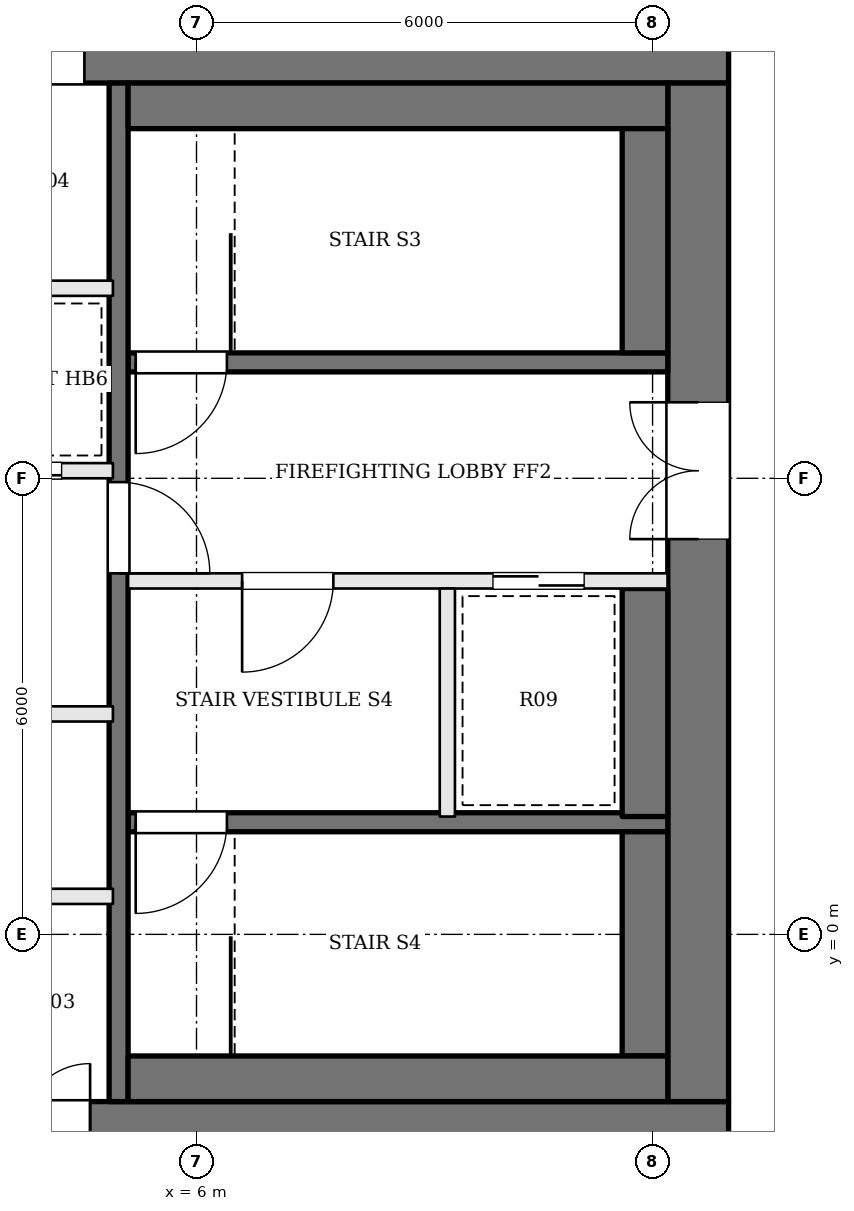
"""IFC4 building model, lengths in metres.
Left out: names, types, materials, properties, quantities, classifications, styles, units other than length and angle.
Written with IfcOpenShell. Run it as: python <this file> out.ifc"""

import sys

from ifc_helpers import new_model, si_unit, direction, frame, frame_2d, origin, place, context, subcontext, project, spatial, rectangle, extrude, element, fill, save


model = new_model("IFC4")
c1 = context("Model", 3, precision=1e-05, world=origin(), true_north=direction((0.0, 1.0)))
c2 = subcontext(c1, "Body", "Model", "MODEL_VIEW")
j1 = project(units=[si_unit("LENGTHUNIT", "METRE"), si_unit("PLANEANGLEUNIT", "RADIAN")], contexts=[c1])
p1 = place(None, origin())
s1 = spatial("IfcSite", under=j1, at=p1, CompositionType="ELEMENT")
p2 = place(p1, origin())
s2 = spatial("IfcBuilding", under=s1, at=p2, CompositionType="ELEMENT")
p3 = place(p2, frame((0.0, 0.0, 303.9)))
s3 = spatial("IfcBuildingStorey", under=s2, at=p3, CompositionType="ELEMENT", Elevation=303.9)
p4 = place(p3, frame((-13.0, 11.6, 0.0), z_axis=(0.0, 0.0, 1.0), x_axis=(1.0, 0.0, 0.0)))
e1 = element("IfcWall", 1, at=p4, inside=s3, PredefinedType="SHEAR", context=c2, shape_type="SweptSolid", body=[
    extrude(rectangle(XDim=26.0, YDim=0.8, at=frame_2d((13.0, 0.0))), origin(), (0.0, 0.0, 1.0), 3.9),
])
p5 = place(p4, frame((9.375, 0.0, 0.0)))
e2 = element("IfcOpeningElement", 2, at=p5, cuts=e1, PredefinedType="OPENING", context=c2, shape_type="SweptSolid", body=[
    extrude(rectangle(XDim=0.7, YDim=2.1, at=frame_2d((0.35, 1.05))), frame((0.0, 0.41, 0.0), z_axis=(0.0, -1.0, 0.0), x_axis=(1.0, 0.0, 0.0)), (0.0, 0.0, 1.0), 0.82),
])
p6 = place(p4, frame((12.075, 0.0, 0.0)))
e3 = element("IfcOpeningElement", 3, at=p6, cuts=e1, PredefinedType="OPENING", context=c2, shape_type="SweptSolid", body=[
    extrude(rectangle(XDim=1.0, YDim=2.1, at=frame_2d((0.5, 1.05))), frame((0.0, 0.41, 0.0), z_axis=(0.0, -1.0, 0.0), x_axis=(1.0, 0.0, 0.0)), (0.0, 0.0, 1.0), 0.82),
])
p7 = place(p4, frame((14.675, 0.0, 0.0)))
e4 = element("IfcOpeningElement", 4, at=p7, cuts=e1, PredefinedType="OPENING", context=c2, shape_type="SweptSolid", body=[
    extrude(rectangle(XDim=0.7, YDim=2.1, at=frame_2d((0.35, 1.05))), frame((0.0, 0.41, 0.0), z_axis=(0.0, -1.0, 0.0), x_axis=(1.0, 0.0, 0.0)), (0.0, 0.0, 1.0), 0.82),
])
p8 = place(p4, frame((16.625, 0.0, 0.0)))
e5 = element("IfcOpeningElement", 5, at=p8, cuts=e1, PredefinedType="OPENING", context=c2, shape_type="SweptSolid", body=[
    extrude(rectangle(XDim=0.9, YDim=2.1, at=frame_2d((0.45, 1.05))), frame((0.0, 0.41, 0.0), z_axis=(0.0, -1.0, 0.0), x_axis=(1.0, 0.0, 0.0)), (0.0, 0.0, 1.0), 0.82),
])
p9 = place(p3, frame((-13.0, -2.6, 0.0), z_axis=(0.0, 0.0, 1.0), x_axis=(1.0, 0.0, 0.0)))
e6 = element("IfcWall", 6, at=p9, inside=s3, PredefinedType="SHEAR", context=c2, shape_type="SweptSolid", body=[
    extrude(rectangle(XDim=26.0, YDim=0.8, at=frame_2d((13.0, 0.0))), origin(), (0.0, 0.0, 1.0), 3.9),
])
p10 = place(p9, frame((9.275, 0.0, 0.0)))
e7 = element("IfcOpeningElement", 7, at=p10, cuts=e6, PredefinedType="OPENING", context=c2, shape_type="SweptSolid", body=[
    extrude(rectangle(XDim=0.9, YDim=2.1, at=frame_2d((0.45, 1.05))), frame((0.0, 0.41, 0.0), z_axis=(0.0, -1.0, 0.0), x_axis=(1.0, 0.0, 0.0)), (0.0, 0.0, 1.0), 0.82),
])
p11 = place(p9, frame((11.75, 0.0, 0.0)))
e8 = element("IfcOpeningElement", 8, at=p11, cuts=e6, PredefinedType="OPENING", context=c2, shape_type="SweptSolid", body=[
    extrude(rectangle(XDim=1.0, YDim=2.1, at=frame_2d((0.5, 1.05))), frame((0.0, 0.41, 0.0), z_axis=(0.0, -1.0, 0.0), x_axis=(1.0, 0.0, 0.0)), (0.0, 0.0, 1.0), 0.82),
])
p12 = place(p9, frame((14.325, 0.0, 0.0)))
e9 = element("IfcOpeningElement", 9, at=p12, cuts=e6, PredefinedType="OPENING", context=c2, shape_type="SweptSolid", body=[
    extrude(rectangle(XDim=0.9, YDim=2.1, at=frame_2d((0.45, 1.05))), frame((0.0, 0.41, 0.0), z_axis=(0.0, -1.0, 0.0), x_axis=(1.0, 0.0, 0.0)), (0.0, 0.0, 1.0), 0.82),
])
p13 = place(p9, frame((16.7, 0.0, 0.0)))
e10 = element("IfcOpeningElement", 10, at=p13, cuts=e6, PredefinedType="OPENING", context=c2, shape_type="SweptSolid", body=[
    extrude(rectangle(XDim=0.9, YDim=2.1, at=frame_2d((0.45, 1.05))), frame((0.0, 0.41, 0.0), z_axis=(0.0, -1.0, 0.0), x_axis=(1.0, 0.0, 0.0)), (0.0, 0.0, 1.0), 0.82),
])
p14 = place(p3, frame((12.6, -2.2, 0.0), z_axis=(0.0, 0.0, 1.0), x_axis=(0.0, 1.0, 0.0)))
e11 = element("IfcWall", 11, at=p14, inside=s3, PredefinedType="SHEAR", context=c2, shape_type="SweptSolid", body=[
    extrude(rectangle(XDim=13.4, YDim=0.8, at=frame_2d((6.7, 0.0))), origin(), (0.0, 0.0, 1.0), 3.9),
])
p15 = place(p14, frame((7.4, 0.0, 0.0)))
e12 = element("IfcOpeningElement", 12, at=p15, cuts=e11, PredefinedType="OPENING", context=c2, shape_type="SweptSolid", body=[
    extrude(rectangle(XDim=1.8, YDim=2.1, at=frame_2d((0.9, 1.05))), frame((0.0, 0.41, 0.0), z_axis=(0.0, -1.0, 0.0), x_axis=(1.0, 0.0, 0.0)), (0.0, 0.0, 1.0), 0.82),
])
p16 = place(p3, frame((12.2, 7.525, 0.0), z_axis=(0.0, 0.0, 1.0), x_axis=(-1.0, 0.0, 0.0)))
e13 = element("IfcWall", 13, at=p16, inside=s3, PredefinedType="SOLIDWALL", context=c2, shape_type="SweptSolid", body=[
    extrude(rectangle(XDim=7.1, YDim=0.25, at=frame_2d((3.55, 0.0))), origin(), (0.0, 0.0, 1.0), 3.7),
])
p17 = place(p16, frame((5.8, 0.0, 0.0)))
e14 = element("IfcOpeningElement", 14, at=p17, cuts=e13, PredefinedType="OPENING", context=c2, shape_type="SweptSolid", body=[
    extrude(rectangle(XDim=1.2, YDim=2.1, at=frame_2d((0.6, 1.05))), frame((0.0, 0.135, 0.0), z_axis=(0.0, -1.0, 0.0), x_axis=(1.0, 0.0, 0.0)), (0.0, 0.0, 1.0), 0.27),
])
p18 = place(p3, frame((12.2, 4.65, 0.0), z_axis=(0.0, 0.0, 1.0), x_axis=(-1.0, 0.0, 0.0)))
e15 = element("IfcWall", 15, at=p18, inside=s3, PredefinedType="SOLIDWALL", context=c2, shape_type="SweptSolid", body=[
    extrude(rectangle(XDim=7.1, YDim=0.2, at=frame_2d((3.55, 0.0))), origin(), (0.0, 0.0, 1.0), 3.7),
])
p19 = place(p18, frame((4.4, 0.0, 0.0)))
e16 = element("IfcOpeningElement", 16, at=p19, cuts=e15, PredefinedType="OPENING", context=c2, shape_type="SweptSolid", body=[
    extrude(rectangle(XDim=1.2, YDim=2.1, at=frame_2d((0.6, 1.05))), frame((0.0, 0.11, 0.0), z_axis=(0.0, -1.0, 0.0), x_axis=(1.0, 0.0, 0.0)), (0.0, 0.0, 1.0), 0.22),
])
p20 = place(p18, frame((1.1, 0.0, 0.0)))
e17 = element("IfcOpeningElement", 17, at=p20, cuts=e15, PredefinedType="OPENING", context=c2, shape_type="SweptSolid", body=[
    extrude(rectangle(XDim=1.2, YDim=2.1, at=frame_2d((0.6, 1.05))), frame((0.0, 0.11, 0.0), z_axis=(0.0, -1.0, 0.0), x_axis=(1.0, 0.0, 0.0)), (0.0, 0.0, 1.0), 0.22),
])
p21 = place(p3, frame((12.2, 1.475, 0.0), z_axis=(0.0, 0.0, 1.0), x_axis=(-1.0, 0.0, 0.0)))
e18 = element("IfcWall", 18, at=p21, inside=s3, PredefinedType="SOLIDWALL", context=c2, shape_type="SweptSolid", body=[
    extrude(rectangle(XDim=7.1, YDim=0.25, at=frame_2d((3.55, 0.0))), origin(), (0.0, 0.0, 1.0), 3.7),
])
p22 = place(p21, frame((5.8, 0.0, 0.0)))
e19 = element("IfcOpeningElement", 19, at=p22, cuts=e18, PredefinedType="OPENING", context=c2, shape_type="SweptSolid", body=[
    extrude(rectangle(XDim=1.2, YDim=2.1, at=frame_2d((0.6, 1.05))), frame((0.0, 0.135, 0.0), z_axis=(0.0, -1.0, 0.0), x_axis=(1.0, 0.0, 0.0)), (0.0, 0.0, 1.0), 0.27),
])
p23 = place(p3, frame((9.3, 4.55, 0.0), z_axis=(0.0, 0.0, 1.0), x_axis=(0.0, -1.0, 0.0)))
e20 = element("IfcWall", 20, at=p23, inside=s3, PredefinedType="SOLIDWALL", context=c2, shape_type="SweptSolid", body=[
    extrude(rectangle(XDim=3.0, YDim=0.2, at=frame_2d((1.5, 0.0))), origin(), (0.0, 0.0, 1.0), 3.7),
])
p24 = place(p3, frame((4.975, 11.2, 0.0), z_axis=(0.0, 0.0, 1.0), x_axis=(0.0, -1.0, 0.0)))
e21 = element("IfcWall", 21, at=p24, inside=s3, PredefinedType="SOLIDWALL", context=c2, shape_type="SweptSolid", body=[
    extrude(rectangle(XDim=13.4, YDim=0.25, at=frame_2d((6.7, 0.0))), origin(), (0.0, 0.0, 1.0), 3.7),
])
p25 = place(p24, frame((5.25, 0.0, 0.0)))
e22 = element("IfcOpeningElement", 22, at=p25, cuts=e21, PredefinedType="OPENING", context=c2, shape_type="SweptSolid", body=[
    extrude(rectangle(XDim=1.2, YDim=2.1, at=frame_2d((0.6, 1.05))), frame((0.0, 0.135, 0.0), z_axis=(0.0, -1.0, 0.0), x_axis=(1.0, 0.0, 0.0)), (0.0, 0.0, 1.0), 0.27),
])
p26 = place(p3, frame((12.2, 10.9, 0.0), z_axis=(0.0, 0.0, 1.0), x_axis=(-1.0, 0.0, 0.0)))
e23 = element("IfcWall", 23, at=p26, inside=s3, PredefinedType="SOLIDWALL", context=c2, shape_type="SweptSolid", body=[
    extrude(rectangle(XDim=7.1, YDim=0.6, at=frame_2d((3.55, 0.0))), origin(), (0.0, 0.0, 1.0), 3.7),
])
p27 = place(p3, frame((11.9, 10.6, 0.0), z_axis=(0.0, 0.0, 1.0), x_axis=(0.0, -1.0, 0.0)))
e24 = element("IfcWall", 24, at=p27, inside=s3, PredefinedType="SOLIDWALL", context=c2, shape_type="SweptSolid", body=[
    extrude(rectangle(XDim=2.95, YDim=0.6, at=frame_2d((1.475, 0.0))), origin(), (0.0, 0.0, 1.0), 3.7),
])
p28 = place(p3, frame((11.9, 4.55, 0.0), z_axis=(0.0, 0.0, 1.0), x_axis=(0.0, -1.0, 0.0)))
e25 = element("IfcWall", 25, at=p28, inside=s3, PredefinedType="SOLIDWALL", context=c2, shape_type="SweptSolid", body=[
    extrude(rectangle(XDim=3.0, YDim=0.6, at=frame_2d((1.5, 0.0))), origin(), (0.0, 0.0, 1.0), 3.7),
])
p29 = place(p3, frame((11.9, 1.35, 0.0), z_axis=(0.0, 0.0, 1.0), x_axis=(0.0, -1.0, 0.0)))
e26 = element("IfcWall", 26, at=p29, inside=s3, PredefinedType="SOLIDWALL", context=c2, shape_type="SweptSolid", body=[
    extrude(rectangle(XDim=2.95, YDim=0.6, at=frame_2d((1.475, 0.0))), origin(), (0.0, 0.0, 1.0), 3.7),
])
p30 = place(p3, frame((12.2, -1.9, 0.0), z_axis=(0.0, 0.0, 1.0), x_axis=(-1.0, 0.0, 0.0)))
e27 = element("IfcWall", 27, at=p30, inside=s3, PredefinedType="SOLIDWALL", context=c2, shape_type="SweptSolid", body=[
    extrude(rectangle(XDim=7.1, YDim=0.6, at=frame_2d((3.55, 0.0))), origin(), (0.0, 0.0, 1.0), 3.7),
])
p31 = place(p3, frame((-4.9, 0.5, 0.0), z_axis=(0.0, 0.0, 1.0), x_axis=(1.0, 0.0, 0.0)))
e28 = element("IfcWall", 28, at=p31, inside=s3, PredefinedType="SOLIDWALL", context=c2, shape_type="SweptSolid", body=[
    extrude(rectangle(XDim=9.8, YDim=0.2, at=frame_2d((4.9, 0.0))), origin(), (0.0, 0.0, 1.0), 3.7),
])
p32 = place(p3, frame((-4.9, 2.9, 0.0), z_axis=(0.0, 0.0, 1.0), x_axis=(1.0, 0.0, 0.0)))
e29 = element("IfcWall", 29, at=p32, inside=s3, PredefinedType="SOLIDWALL", context=c2, shape_type="SweptSolid", body=[
    extrude(rectangle(XDim=9.8, YDim=0.2, at=frame_2d((4.9, 0.0))), origin(), (0.0, 0.0, 1.0), 3.7),
])
p33 = place(p32, frame((0.675, 0.0, 0.0)))
e30 = element("IfcOpeningElement", 30, at=p33, cuts=e29, PredefinedType="OPENING", context=c2, shape_type="SweptSolid", body=[
    extrude(rectangle(XDim=1.1, YDim=2.1, at=frame_2d((0.55, 1.05))), frame((0.0, 0.11, 0.0), z_axis=(0.0, -1.0, 0.0), x_axis=(1.0, 0.0, 0.0)), (0.0, 0.0, 1.0), 0.22),
])
p34 = place(p32, frame((2.613, 0.0, 0.0)))
e31 = element("IfcOpeningElement", 31, at=p34, cuts=e29, PredefinedType="OPENING", context=c2, shape_type="SweptSolid", body=[
    extrude(rectangle(XDim=0.9, YDim=2.1, at=frame_2d((0.45, 1.05))), frame((0.0, 0.11, 0.0), z_axis=(0.0, -1.0, 0.0), x_axis=(1.0, 0.0, 0.0)), (0.0, 0.0, 1.0), 0.22),
])
p35 = place(p32, frame((4.35, 0.0, 0.0)))
e32 = element("IfcOpeningElement", 32, at=p35, cuts=e29, PredefinedType="OPENING", context=c2, shape_type="SweptSolid", body=[
    extrude(rectangle(XDim=1.1, YDim=2.1, at=frame_2d((0.55, 1.05))), frame((0.0, 0.11, 0.0), z_axis=(0.0, -1.0, 0.0), x_axis=(1.0, 0.0, 0.0)), (0.0, 0.0, 1.0), 0.22),
])
p36 = place(p32, frame((7.463, 0.0, 0.0)))
e33 = element("IfcOpeningElement", 33, at=p36, cuts=e29, PredefinedType="OPENING", context=c2, shape_type="SweptSolid", body=[
    extrude(rectangle(XDim=1.0, YDim=2.1, at=frame_2d((0.5, 1.05))), frame((0.0, 0.11, 0.0), z_axis=(0.0, -1.0, 0.0), x_axis=(1.0, 0.0, 0.0)), (0.0, 0.0, 1.0), 0.22),
])
p37 = place(p3, frame((-4.9, 6.1, 0.0), z_axis=(0.0, 0.0, 1.0), x_axis=(1.0, 0.0, 0.0)))
e34 = element("IfcWall", 34, at=p37, inside=s3, PredefinedType="SOLIDWALL", context=c2, shape_type="SweptSolid", body=[
    extrude(rectangle(XDim=9.8, YDim=0.2, at=frame_2d((4.9, 0.0))), origin(), (0.0, 0.0, 1.0), 3.7),
])
p38 = place(p37, frame((0.675, 0.0, 0.0)))
e35 = element("IfcOpeningElement", 35, at=p38, cuts=e34, PredefinedType="OPENING", context=c2, shape_type="SweptSolid", body=[
    extrude(rectangle(XDim=1.1, YDim=2.1, at=frame_2d((0.55, 1.05))), frame((0.0, 0.11, 0.0), z_axis=(0.0, -1.0, 0.0), x_axis=(1.0, 0.0, 0.0)), (0.0, 0.0, 1.0), 0.22),
])
p39 = place(p37, frame((3.125, 0.0, 0.0)))
e36 = element("IfcOpeningElement", 36, at=p39, cuts=e34, PredefinedType="OPENING", context=c2, shape_type="SweptSolid", body=[
    extrude(rectangle(XDim=1.1, YDim=2.1, at=frame_2d((0.55, 1.05))), frame((0.0, 0.11, 0.0), z_axis=(0.0, -1.0, 0.0), x_axis=(1.0, 0.0, 0.0)), (0.0, 0.0, 1.0), 0.22),
])
p40 = place(p37, frame((5.575, 0.0, 0.0)))
e37 = element("IfcOpeningElement", 37, at=p40, cuts=e34, PredefinedType="OPENING", context=c2, shape_type="SweptSolid", body=[
    extrude(rectangle(XDim=1.1, YDim=2.1, at=frame_2d((0.55, 1.05))), frame((0.0, 0.11, 0.0), z_axis=(0.0, -1.0, 0.0), x_axis=(1.0, 0.0, 0.0)), (0.0, 0.0, 1.0), 0.22),
])
p41 = place(p37, frame((8.025, 0.0, 0.0)))
e38 = element("IfcOpeningElement", 38, at=p41, cuts=e34, PredefinedType="OPENING", context=c2, shape_type="SweptSolid", body=[
    extrude(rectangle(XDim=1.1, YDim=2.1, at=frame_2d((0.55, 1.05))), frame((0.0, 0.11, 0.0), z_axis=(0.0, -1.0, 0.0), x_axis=(1.0, 0.0, 0.0)), (0.0, 0.0, 1.0), 0.22),
])
p42 = place(p3, frame((-4.9, 8.5, 0.0), z_axis=(0.0, 0.0, 1.0), x_axis=(1.0, 0.0, 0.0)))
e39 = element("IfcWall", 39, at=p42, inside=s3, PredefinedType="SOLIDWALL", context=c2, shape_type="SweptSolid", body=[
    extrude(rectangle(XDim=9.8, YDim=0.2, at=frame_2d((4.9, 0.0))), origin(), (0.0, 0.0, 1.0), 3.7),
])
p43 = place(p15, origin())
e40 = element("IfcDoor", 40, at=p43, inside=s3, OperationType="DOUBLE_DOOR_SINGLE_SWING", PredefinedType="DOOR", context=c2, shape_type="SweptSolid", body=[
    extrude(rectangle(XDim=1.8, YDim=2.1, at=frame_2d((0.9, 1.05))), frame((0.0, 0.025, 0.0), z_axis=(0.0, -1.0, 0.0), x_axis=(1.0, 0.0, 0.0)), (0.0, 0.0, 1.0), 0.05),
])
fill(e12, e40)
p44 = place(p25, origin())
e41 = element("IfcDoor", 41, at=p44, inside=s3, OperationType="SINGLE_SWING_RIGHT", PredefinedType="DOOR", context=c2, shape_type="SweptSolid", body=[
    extrude(rectangle(XDim=1.2, YDim=2.1, at=frame_2d((0.6, 1.05))), frame((0.0, 0.025, 0.0), z_axis=(0.0, -1.0, 0.0), x_axis=(1.0, 0.0, 0.0)), (0.0, 0.0, 1.0), 0.05),
])
fill(e22, e41)
p45 = place(p19, origin())
e42 = element("IfcDoor", 42, at=p45, inside=s3, OperationType="SINGLE_SWING_RIGHT", PredefinedType="DOOR", context=c2, shape_type="SweptSolid", body=[
    extrude(rectangle(XDim=1.2, YDim=2.1, at=frame_2d((0.6, 1.05))), frame((0.0, 0.025, 0.0), z_axis=(0.0, -1.0, 0.0), x_axis=(1.0, 0.0, 0.0)), (0.0, 0.0, 1.0), 0.05),
])
fill(e16, e42)
p46 = place(p17, origin())
e43 = element("IfcDoor", 43, at=p46, inside=s3, OperationType="SINGLE_SWING_RIGHT", PredefinedType="DOOR", context=c2, shape_type="SweptSolid", body=[
    extrude(rectangle(XDim=1.2, YDim=2.1, at=frame_2d((0.6, 1.05))), frame((0.0, 0.025, 0.0), z_axis=(0.0, -1.0, 0.0), x_axis=(1.0, 0.0, 0.0)), (0.0, 0.0, 1.0), 0.05),
])
fill(e14, e43)
p47 = place(p22, origin())
e44 = element("IfcDoor", 44, at=p47, inside=s3, OperationType="SINGLE_SWING_RIGHT", PredefinedType="DOOR", context=c2, shape_type="SweptSolid", body=[
    extrude(rectangle(XDim=1.2, YDim=2.1, at=frame_2d((0.6, 1.05))), frame((0.0, 0.025, 0.0), z_axis=(0.0, -1.0, 0.0), x_axis=(1.0, 0.0, 0.0)), (0.0, 0.0, 1.0), 0.05),
])
fill(e19, e44)
p48 = place(p20, origin())
e45 = element("IfcDoor", 45, at=p48, inside=s3, OperationType="SLIDING_TO_RIGHT", PredefinedType="DOOR", context=c2, shape_type="SweptSolid", body=[
    extrude(rectangle(XDim=1.2, YDim=2.1, at=frame_2d((0.6, 1.05))), frame((0.0, 0.025, 0.0), z_axis=(0.0, -1.0, 0.0), x_axis=(1.0, 0.0, 0.0)), (0.0, 0.0, 1.0), 0.05),
])
fill(e17, e45)
p49 = place(p41, origin())
e46 = element("IfcDoor", 46, at=p49, inside=s3, OperationType="SLIDING_TO_LEFT", PredefinedType="DOOR", context=c2, shape_type="SweptSolid", body=[
    extrude(rectangle(XDim=1.1, YDim=2.1, at=frame_2d((0.55, 1.05))), frame((0.0, 0.025, 0.0), z_axis=(0.0, -1.0, 0.0), x_axis=(1.0, 0.0, 0.0)), (0.0, 0.0, 1.0), 0.05),
])
fill(e38, e46)
p50 = place(p13, origin())
e47 = element("IfcDoor", 47, at=p50, inside=s3, OperationType="SINGLE_SWING_RIGHT", PredefinedType="DOOR", context=c2, shape_type="SweptSolid", body=[
    extrude(rectangle(XDim=0.9, YDim=2.1, at=frame_2d((0.45, 1.05))), frame((0.0, 0.025, 0.0), z_axis=(0.0, -1.0, 0.0), x_axis=(1.0, 0.0, 0.0)), (0.0, 0.0, 1.0), 0.05),
])
fill(e10, e47)
p51 = place(p8, origin())
e48 = element("IfcDoor", 48, at=p51, inside=s3, OperationType="SINGLE_SWING_RIGHT", PredefinedType="DOOR", context=c2, shape_type="SweptSolid", body=[
    extrude(rectangle(XDim=0.9, YDim=2.1, at=frame_2d((0.45, 1.05))), frame((0.0, 0.025, 0.0), z_axis=(0.0, -1.0, 0.0), x_axis=(1.0, 0.0, 0.0)), (0.0, 0.0, 1.0), 0.05),
])
fill(e5, e48)
save(model, sys.argv[1])
